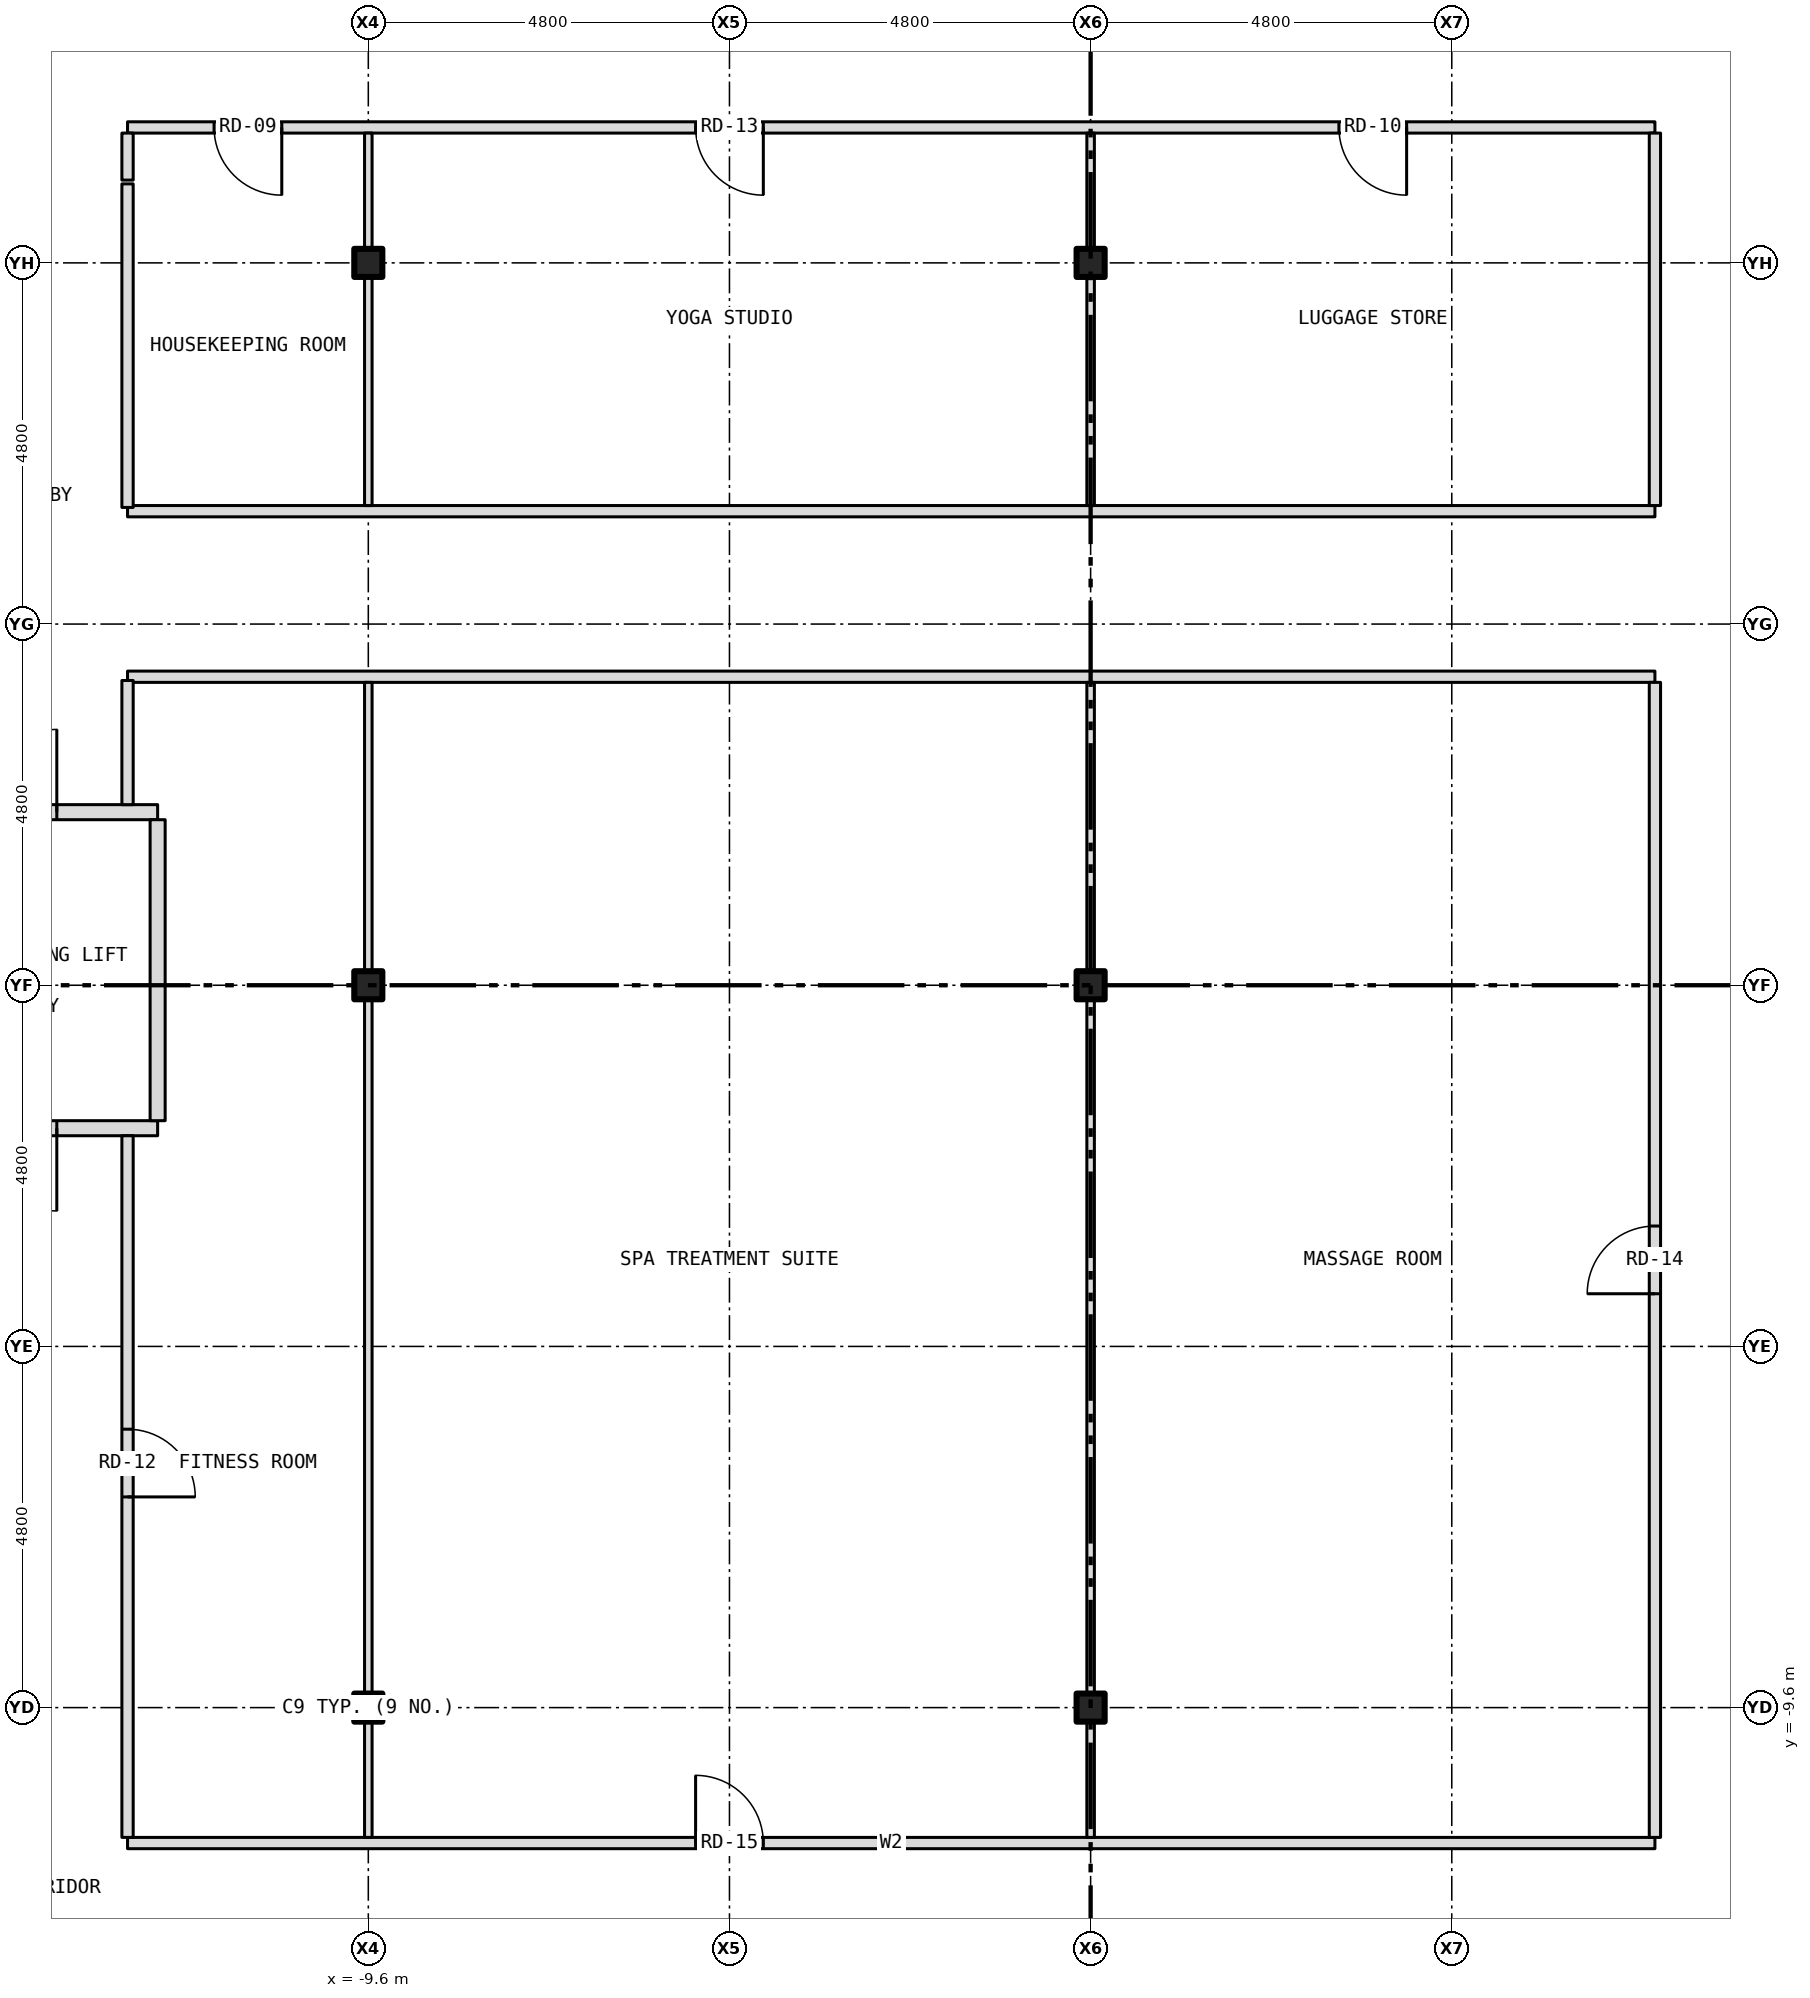
"""IFC4 building model, lengths in metres.
Left out: names, types, materials, properties, quantities, classifications, styles, units other than length and angle.
Written with IfcOpenShell. Run it as: python <this file> out.ifc"""

import sys

from ifc_helpers import new_model, si_unit, direction, frame, frame_2d, origin, origin_2d, place, context, subcontext, project, spatial, rectangle, i_section, extrude, element, fill, save


model = new_model("IFC4")
c1 = context("Model", 3, precision=1e-05, world=origin(), true_north=direction((0.0, 1.0)))
c2 = subcontext(c1, "Body", "Model", "MODEL_VIEW")
j1 = project(units=[si_unit("LENGTHUNIT", "METRE"), si_unit("PLANEANGLEUNIT", "RADIAN")], contexts=[c1])
p1 = place(None, origin())
s1 = spatial("IfcSite", under=j1, at=p1, CompositionType="ELEMENT")
p2 = place(p1, origin())
s2 = spatial("IfcBuilding", under=s1, at=p2, CompositionType="ELEMENT")
p3 = place(p2, frame((0.0, 0.0, 176.0)))
s3 = spatial("IfcBuildingStorey", under=s2, at=p3, CompositionType="ELEMENT", Elevation=176.0)
for number, where, z_axis, x_axis in (
    (1, (-9.6, -9.6, -0.15), (0.0, 0.0, 1.0), (1.0, 0.0, 0.0)),
    (2, (-9.6, 0.0, -0.15), (0.0, 0.0, 1.0), (1.0, 0.0, 0.0)),
    (3, (-9.6, 9.6, -0.15), (0.0, 0.0, 1.0), (1.0, 0.0, 0.0)),
    (4, (0.0, -9.6, -0.15), (0.0, 0.0, 1.0), (1.0, 0.0, 0.0)),
    (5, (0.0, 0.0, -0.15), (0.0, 0.0, 1.0), (1.0, 0.0, 0.0)),
    (6, (0.0, 9.6, -0.15), (0.0, 0.0, 1.0), (1.0, 0.0, 0.0)),
):
    element("IfcColumn", number, at=place(p3, frame(where, z_axis=z_axis, x_axis=x_axis)), inside=s3, PredefinedType="COLUMN", context=c2, shape_type="SweptSolid", body=[
        extrude(i_section(OverallWidth=0.373, OverallDepth=0.373, WebThickness=0.016, FlangeThickness=0.026, at=origin_2d()), origin(), (0.0, 0.0, 1.0), 3.5),
    ])
p4 = place(p3, frame((-12.8, -11.4, 0.0), z_axis=(0.0, 0.0, 1.0), x_axis=(1.0, 0.0, 0.0)))
e7 = element("IfcWall", 7, at=p4, inside=s3, PredefinedType="PARTITIONING", context=c2, shape_type="SweptSolid", body=[
    extrude(rectangle(XDim=20.3, YDim=0.15, at=frame_2d((10.15, 0.0))), origin(), (0.0, 0.0, 1.0), 3.35),
])
p5 = place(p4, frame((7.55, 0.0, 0.0)))
e8 = element("IfcOpeningElement", 8, at=p5, cuts=e7, PredefinedType="OPENING", context=c2, shape_type="SweptSolid", body=[
    extrude(rectangle(XDim=0.9, YDim=2.1, at=frame_2d((0.45, 1.05))), frame((0.0, 0.087, 0.0), z_axis=(0.0, -1.0, 0.0), x_axis=(1.0, 0.0, 0.0)), (0.0, 0.0, 1.0), 0.174),
])
p6 = place(p3, frame((-15.68, -1.9, 0.0), z_axis=(0.0, 0.0, 1.0), x_axis=(1.0, 0.0, 0.0)))
e9 = element("IfcWall", 9, at=p6, inside=s3, PredefinedType="PARTITIONING", context=c2, shape_type="SweptSolid", body=[
    extrude(rectangle(XDim=3.28, YDim=0.2, at=frame_2d((1.64, 0.0))), origin(), (0.0, 0.0, 1.0), 3.35),
])
p7 = place(p6, frame((0.84, 0.0, 0.0)))
e10 = element("IfcOpeningElement", 10, at=p7, cuts=e9, PredefinedType="OPENING", context=c2, shape_type="SweptSolid", body=[
    extrude(rectangle(XDim=1.1, YDim=2.1, at=frame_2d((0.55, 1.05))), frame((0.0, 0.112, 0.0), z_axis=(0.0, -1.0, 0.0), x_axis=(1.0, 0.0, 0.0)), (0.0, 0.0, 1.0), 0.224),
])
p8 = place(p3, frame((-15.68, 2.3, 0.0), z_axis=(0.0, 0.0, 1.0), x_axis=(1.0, 0.0, 0.0)))
e11 = element("IfcWall", 11, at=p8, inside=s3, PredefinedType="PARTITIONING", context=c2, shape_type="SweptSolid", body=[
    extrude(rectangle(XDim=3.28, YDim=0.2, at=frame_2d((1.64, 0.0))), origin(), (0.0, 0.0, 1.0), 3.35),
])
p9 = place(p8, frame((0.84, 0.0, 0.0)))
e12 = element("IfcOpeningElement", 12, at=p9, cuts=e11, PredefinedType="OPENING", context=c2, shape_type="SweptSolid", body=[
    extrude(rectangle(XDim=1.1, YDim=2.1, at=frame_2d((0.55, 1.05))), frame((0.0, 0.112, 0.0), z_axis=(0.0, -1.0, 0.0), x_axis=(1.0, 0.0, 0.0)), (0.0, 0.0, 1.0), 0.224),
])
for number, where, z_axis, x_axis in (
    (13, (-12.8, 4.1, 0.0), (0.0, 0.0, 1.0), (1.0, 0.0, 0.0)),
    (14, (-12.8, 6.3, 0.0), (0.0, 0.0, 1.0), (1.0, 0.0, 0.0)),
):
    element("IfcWall", number, at=place(p3, frame(where, z_axis=z_axis, x_axis=x_axis)), inside=s3, PredefinedType="PARTITIONING", context=c2, shape_type="SweptSolid", body=[
        extrude(rectangle(XDim=20.3, YDim=0.15, at=frame_2d((10.15, 0.0))), origin(), (0.0, 0.0, 1.0), 3.35),
    ])
p10 = place(p3, frame((-12.8, 11.4, 0.0), z_axis=(0.0, 0.0, 1.0), x_axis=(1.0, 0.0, 0.0)))
e15 = element("IfcWall", 15, at=p10, inside=s3, PredefinedType="PARTITIONING", context=c2, shape_type="SweptSolid", body=[
    extrude(rectangle(XDim=20.3, YDim=0.15, at=frame_2d((10.15, 0.0))), origin(), (0.0, 0.0, 1.0), 3.35),
])
p11 = place(p10, frame((1.15, 0.0, 0.0)))
e16 = element("IfcOpeningElement", 16, at=p11, cuts=e15, PredefinedType="OPENING", context=c2, shape_type="SweptSolid", body=[
    extrude(rectangle(XDim=0.9, YDim=2.1, at=frame_2d((0.45, 1.05))), frame((0.0, 0.087, 0.0), z_axis=(0.0, -1.0, 0.0), x_axis=(1.0, 0.0, 0.0)), (0.0, 0.0, 1.0), 0.174),
])
p12 = place(p10, frame((16.1, 0.0, 0.0)))
e17 = element("IfcOpeningElement", 17, at=p12, cuts=e15, PredefinedType="OPENING", context=c2, shape_type="SweptSolid", body=[
    extrude(rectangle(XDim=0.9, YDim=2.1, at=frame_2d((0.45, 1.05))), frame((0.0, 0.087, 0.0), z_axis=(0.0, -1.0, 0.0), x_axis=(1.0, 0.0, 0.0)), (0.0, 0.0, 1.0), 0.174),
])
p13 = place(p10, frame((7.55, 0.0, 0.0)))
e18 = element("IfcOpeningElement", 18, at=p13, cuts=e15, PredefinedType="OPENING", context=c2, shape_type="SweptSolid", body=[
    extrude(rectangle(XDim=0.9, YDim=2.1, at=frame_2d((0.45, 1.05))), frame((0.0, 0.087, 0.0), z_axis=(0.0, -1.0, 0.0), x_axis=(1.0, 0.0, 0.0)), (0.0, 0.0, 1.0), 0.174),
])
p14 = place(p3, frame((-12.8, -11.325, 0.0), z_axis=(0.0, 0.0, 1.0), x_axis=(0.0, 1.0, 0.0)))
e19 = element("IfcWall", 19, at=p14, inside=s3, PredefinedType="PARTITIONING", context=c2, shape_type="SweptSolid", body=[
    extrude(rectangle(XDim=9.325, YDim=0.15, at=frame_2d((4.663, 0.0))), origin(), (0.0, 0.0, 1.0), 3.35),
])
p15 = place(p14, frame((4.525, 0.0, 0.0)))
e20 = element("IfcOpeningElement", 20, at=p15, cuts=e19, PredefinedType="OPENING", context=c2, shape_type="SweptSolid", body=[
    extrude(rectangle(XDim=0.9, YDim=2.1, at=frame_2d((0.45, 1.05))), frame((0.0, 0.087, 0.0), z_axis=(0.0, -1.0, 0.0), x_axis=(1.0, 0.0, 0.0)), (0.0, 0.0, 1.0), 0.174),
])
p16 = place(p3, frame((-12.8, 2.4, 0.0), z_axis=(0.0, 0.0, 1.0), x_axis=(0.0, 1.0, 0.0)))
e21 = element("IfcWall", 21, at=p16, inside=s3, PredefinedType="PARTITIONING", context=c2, shape_type="SweptSolid", body=[
    extrude(rectangle(XDim=1.65, YDim=0.15, at=frame_2d((0.825, 0.0))), origin(), (0.0, 0.0, 1.0), 3.35),
])
p17 = place(p3, frame((-12.8, 6.35, 0.0), z_axis=(0.0, 0.0, 1.0), x_axis=(0.0, 1.0, 0.0)))
e22 = element("IfcWall", 22, at=p17, inside=s3, PredefinedType="PARTITIONING", context=c2, shape_type="SweptSolid", body=[
    extrude(rectangle(XDim=4.3, YDim=0.15, at=frame_2d((2.15, 0.0))), origin(), (0.0, 0.0, 1.0), 3.35),
])
p18 = place(p3, frame((-12.8, 10.7, 0.0), z_axis=(0.0, 0.0, 1.0), x_axis=(0.0, 1.0, 0.0)))
e23 = element("IfcWall", 23, at=p18, inside=s3, PredefinedType="PARTITIONING", context=c2, shape_type="SweptSolid", body=[
    extrude(rectangle(XDim=0.625, YDim=0.15, at=frame_2d((0.312, 0.0))), origin(), (0.0, 0.0, 1.0), 3.35),
])
p19 = place(p3, frame((-12.4, -1.8, 0.0), z_axis=(0.0, 0.0, 1.0), x_axis=(0.0, 1.0, 0.0)))
e24 = element("IfcWall", 24, at=p19, inside=s3, PredefinedType="PARTITIONING", context=c2, shape_type="SweptSolid", body=[
    extrude(rectangle(XDim=4.0, YDim=0.2, at=frame_2d((2.0, 0.0))), origin(), (0.0, 0.0, 1.0), 3.35),
])
p20 = place(p3, frame((-9.6, -11.325, 0.0), z_axis=(0.0, 0.0, 1.0), x_axis=(0.0, 1.0, 0.0)))
e25 = element("IfcWall", 25, at=p20, inside=s3, PredefinedType="PARTITIONING", context=c2, shape_type="SweptSolid", body=[
    extrude(rectangle(XDim=1.538, YDim=0.1, at=frame_2d((0.769, 0.0))), origin(), (0.0, 0.0, 1.0), 2.728),
])
p21 = place(p3, frame((-9.6, -9.787, 0.0), z_axis=(0.0, 0.0, 1.0), x_axis=(0.0, 1.0, 0.0)))
e26 = element("IfcWall", 26, at=p21, inside=s3, PredefinedType="PARTITIONING", context=c2, shape_type="SweptSolid", body=[
    extrude(rectangle(XDim=0.374, YDim=0.1, at=frame_2d((0.187, 0.0))), origin(), (0.0, 0.0, 1.0), 3.35),
])
p22 = place(p3, frame((-9.6, -9.413, 0.0), z_axis=(0.0, 0.0, 1.0), x_axis=(0.0, 1.0, 0.0)))
e27 = element("IfcWall", 27, at=p22, inside=s3, PredefinedType="PARTITIONING", context=c2, shape_type="SweptSolid", body=[
    extrude(rectangle(XDim=9.226, YDim=0.1, at=frame_2d((4.613, 0.0))), origin(), (0.0, 0.0, 1.0), 2.728),
])
p23 = place(p3, frame((-9.6, -0.187, 0.0), z_axis=(0.0, 0.0, 1.0), x_axis=(0.0, 1.0, 0.0)))
e28 = element("IfcWall", 28, at=p23, inside=s3, PredefinedType="PARTITIONING", context=c2, shape_type="SweptSolid", body=[
    extrude(rectangle(XDim=0.374, YDim=0.1, at=frame_2d((0.187, 0.0))), origin(), (0.0, 0.0, 1.0), 3.35),
])
p24 = place(p3, frame((-9.6, 0.187, 0.0), z_axis=(0.0, 0.0, 1.0), x_axis=(0.0, 1.0, 0.0)))
e29 = element("IfcWall", 29, at=p24, inside=s3, PredefinedType="PARTITIONING", context=c2, shape_type="SweptSolid", body=[
    extrude(rectangle(XDim=3.838, YDim=0.1, at=frame_2d((1.919, 0.0))), origin(), (0.0, 0.0, 1.0), 2.728),
])
p25 = place(p3, frame((-9.6, 6.375, 0.0), z_axis=(0.0, 0.0, 1.0), x_axis=(0.0, 1.0, 0.0)))
e30 = element("IfcWall", 30, at=p25, inside=s3, PredefinedType="PARTITIONING", context=c2, shape_type="SweptSolid", body=[
    extrude(rectangle(XDim=3.038, YDim=0.1, at=frame_2d((1.519, 0.0))), origin(), (0.0, 0.0, 1.0), 2.728),
])
p26 = place(p3, frame((-9.6, 9.413, 0.0), z_axis=(0.0, 0.0, 1.0), x_axis=(0.0, 1.0, 0.0)))
e31 = element("IfcWall", 31, at=p26, inside=s3, PredefinedType="PARTITIONING", context=c2, shape_type="SweptSolid", body=[
    extrude(rectangle(XDim=0.374, YDim=0.1, at=frame_2d((0.187, 0.0))), origin(), (0.0, 0.0, 1.0), 3.35),
])
for number, where, z_axis, x_axis in (
    (32, (-9.6, 9.787, 0.0), (0.0, 0.0, 1.0), (0.0, 1.0, 0.0)),
    (33, (0.0, -11.325, 0.0), (0.0, 0.0, 1.0), (0.0, 1.0, 0.0)),
):
    element("IfcWall", number, at=place(p3, frame(where, z_axis=z_axis, x_axis=x_axis)), inside=s3, PredefinedType="PARTITIONING", context=c2, shape_type="SweptSolid", body=[
        extrude(rectangle(XDim=1.538, YDim=0.1, at=frame_2d((0.769, 0.0))), origin(), (0.0, 0.0, 1.0), 2.728),
    ])
p27 = place(p3, frame((0.0, -9.787, 0.0), z_axis=(0.0, 0.0, 1.0), x_axis=(0.0, 1.0, 0.0)))
e34 = element("IfcWall", 34, at=p27, inside=s3, PredefinedType="PARTITIONING", context=c2, shape_type="SweptSolid", body=[
    extrude(rectangle(XDim=0.374, YDim=0.1, at=frame_2d((0.187, 0.0))), origin(), (0.0, 0.0, 1.0), 3.35),
])
p28 = place(p3, frame((0.0, -9.413, 0.0), z_axis=(0.0, 0.0, 1.0), x_axis=(0.0, 1.0, 0.0)))
e35 = element("IfcWall", 35, at=p28, inside=s3, PredefinedType="PARTITIONING", context=c2, shape_type="SweptSolid", body=[
    extrude(rectangle(XDim=9.226, YDim=0.1, at=frame_2d((4.613, 0.0))), origin(), (0.0, 0.0, 1.0), 2.728),
])
p29 = place(p3, frame((0.0, -0.187, 0.0), z_axis=(0.0, 0.0, 1.0), x_axis=(0.0, 1.0, 0.0)))
e36 = element("IfcWall", 36, at=p29, inside=s3, PredefinedType="PARTITIONING", context=c2, shape_type="SweptSolid", body=[
    extrude(rectangle(XDim=0.374, YDim=0.1, at=frame_2d((0.187, 0.0))), origin(), (0.0, 0.0, 1.0), 3.35),
])
p30 = place(p3, frame((0.0, 0.187, 0.0), z_axis=(0.0, 0.0, 1.0), x_axis=(0.0, 1.0, 0.0)))
e37 = element("IfcWall", 37, at=p30, inside=s3, PredefinedType="PARTITIONING", context=c2, shape_type="SweptSolid", body=[
    extrude(rectangle(XDim=3.838, YDim=0.1, at=frame_2d((1.919, 0.0))), origin(), (0.0, 0.0, 1.0), 2.728),
])
p31 = place(p3, frame((0.0, 6.375, 0.0), z_axis=(0.0, 0.0, 1.0), x_axis=(0.0, 1.0, 0.0)))
e38 = element("IfcWall", 38, at=p31, inside=s3, PredefinedType="PARTITIONING", context=c2, shape_type="SweptSolid", body=[
    extrude(rectangle(XDim=3.038, YDim=0.1, at=frame_2d((1.519, 0.0))), origin(), (0.0, 0.0, 1.0), 2.728),
])
p32 = place(p3, frame((0.0, 9.413, 0.0), z_axis=(0.0, 0.0, 1.0), x_axis=(0.0, 1.0, 0.0)))
e39 = element("IfcWall", 39, at=p32, inside=s3, PredefinedType="PARTITIONING", context=c2, shape_type="SweptSolid", body=[
    extrude(rectangle(XDim=0.374, YDim=0.1, at=frame_2d((0.187, 0.0))), origin(), (0.0, 0.0, 1.0), 3.35),
])
p33 = place(p3, frame((0.0, 9.787, 0.0), z_axis=(0.0, 0.0, 1.0), x_axis=(0.0, 1.0, 0.0)))
e40 = element("IfcWall", 40, at=p33, inside=s3, PredefinedType="PARTITIONING", context=c2, shape_type="SweptSolid", body=[
    extrude(rectangle(XDim=1.538, YDim=0.1, at=frame_2d((0.769, 0.0))), origin(), (0.0, 0.0, 1.0), 2.728),
])
p34 = place(p3, frame((7.5, -11.325, 0.0), z_axis=(0.0, 0.0, 1.0), x_axis=(0.0, 1.0, 0.0)))
e41 = element("IfcWall", 41, at=p34, inside=s3, PredefinedType="PARTITIONING", context=c2, shape_type="SweptSolid", body=[
    extrude(rectangle(XDim=15.35, YDim=0.15, at=frame_2d((7.675, 0.0))), origin(), (0.0, 0.0, 1.0), 3.35),
])
p35 = place(p34, frame((7.225, 0.0, 0.0)))
e42 = element("IfcOpeningElement", 42, at=p35, cuts=e41, PredefinedType="OPENING", context=c2, shape_type="SweptSolid", body=[
    extrude(rectangle(XDim=0.9, YDim=2.1, at=frame_2d((0.45, 1.05))), frame((0.0, 0.087, 0.0), z_axis=(0.0, -1.0, 0.0), x_axis=(1.0, 0.0, 0.0)), (0.0, 0.0, 1.0), 0.174),
])
p36 = place(p3, frame((7.5, 6.375, 0.0), z_axis=(0.0, 0.0, 1.0), x_axis=(0.0, 1.0, 0.0)))
e43 = element("IfcWall", 43, at=p36, inside=s3, PredefinedType="PARTITIONING", context=c2, shape_type="SweptSolid", body=[
    extrude(rectangle(XDim=4.95, YDim=0.15, at=frame_2d((2.475, 0.0))), origin(), (0.0, 0.0, 1.0), 3.35),
])
p37 = place(p9, origin())
e44 = element("IfcDoor", 44, at=p37, inside=s3, OperationType="SINGLE_SWING_RIGHT", PredefinedType="DOOR", context=c2, shape_type="SweptSolid", body=[
    extrude(rectangle(XDim=1.1, YDim=2.1, at=frame_2d((0.55, 1.05))), frame((0.0, 0.025, 0.0), z_axis=(0.0, -1.0, 0.0), x_axis=(1.0, 0.0, 0.0)), (0.0, 0.0, 1.0), 0.05),
])
fill(e12, e44)
p38 = place(p7, origin())
e45 = element("IfcDoor", 45, at=p38, inside=s3, OperationType="SINGLE_SWING_RIGHT", PredefinedType="DOOR", context=c2, shape_type="SweptSolid", body=[
    extrude(rectangle(XDim=1.1, YDim=2.1, at=frame_2d((0.55, 1.05))), frame((0.0, 0.025, 0.0), z_axis=(0.0, -1.0, 0.0), x_axis=(1.0, 0.0, 0.0)), (0.0, 0.0, 1.0), 0.05),
])
fill(e10, e45)
p39 = place(p11, origin())
e46 = element("IfcDoor", 46, at=p39, inside=s3, OperationType="SINGLE_SWING_RIGHT", PredefinedType="DOOR", context=c2, shape_type="SweptSolid", body=[
    extrude(rectangle(XDim=0.9, YDim=2.1, at=frame_2d((0.45, 1.05))), frame((0.0, 0.025, 0.0), z_axis=(0.0, -1.0, 0.0), x_axis=(1.0, 0.0, 0.0)), (0.0, 0.0, 1.0), 0.05),
])
fill(e16, e46)
p40 = place(p12, origin())
e47 = element("IfcDoor", 47, at=p40, inside=s3, OperationType="SINGLE_SWING_RIGHT", PredefinedType="DOOR", context=c2, shape_type="SweptSolid", body=[
    extrude(rectangle(XDim=0.9, YDim=2.1, at=frame_2d((0.45, 1.05))), frame((0.0, 0.025, 0.0), z_axis=(0.0, -1.0, 0.0), x_axis=(1.0, 0.0, 0.0)), (0.0, 0.0, 1.0), 0.05),
])
fill(e17, e47)
p41 = place(p15, origin())
e48 = element("IfcDoor", 48, at=p41, inside=s3, OperationType="SINGLE_SWING_LEFT", PredefinedType="DOOR", context=c2, shape_type="SweptSolid", body=[
    extrude(rectangle(XDim=0.9, YDim=2.1, at=frame_2d((0.45, 1.05))), frame((0.0, 0.025, 0.0), z_axis=(0.0, -1.0, 0.0), x_axis=(1.0, 0.0, 0.0)), (0.0, 0.0, 1.0), 0.05),
])
fill(e20, e48)
p42 = place(p13, origin())
e49 = element("IfcDoor", 49, at=p42, inside=s3, OperationType="SINGLE_SWING_RIGHT", PredefinedType="DOOR", context=c2, shape_type="SweptSolid", body=[
    extrude(rectangle(XDim=0.9, YDim=2.1, at=frame_2d((0.45, 1.05))), frame((0.0, 0.025, 0.0), z_axis=(0.0, -1.0, 0.0), x_axis=(1.0, 0.0, 0.0)), (0.0, 0.0, 1.0), 0.05),
])
fill(e18, e49)
p43 = place(p35, origin())
e50 = element("IfcDoor", 50, at=p43, inside=s3, OperationType="SINGLE_SWING_LEFT", PredefinedType="DOOR", context=c2, shape_type="SweptSolid", body=[
    extrude(rectangle(XDim=0.9, YDim=2.1, at=frame_2d((0.45, 1.05))), frame((0.0, 0.025, 0.0), z_axis=(0.0, -1.0, 0.0), x_axis=(1.0, 0.0, 0.0)), (0.0, 0.0, 1.0), 0.05),
])
fill(e42, e50)
p44 = place(p5, origin())
e51 = element("IfcDoor", 51, at=p44, inside=s3, OperationType="SINGLE_SWING_LEFT", PredefinedType="DOOR", context=c2, shape_type="SweptSolid", body=[
    extrude(rectangle(XDim=0.9, YDim=2.1, at=frame_2d((0.45, 1.05))), frame((0.0, 0.025, 0.0), z_axis=(0.0, -1.0, 0.0), x_axis=(1.0, 0.0, 0.0)), (0.0, 0.0, 1.0), 0.05),
])
fill(e8, e51)
save(model, sys.argv[1])
